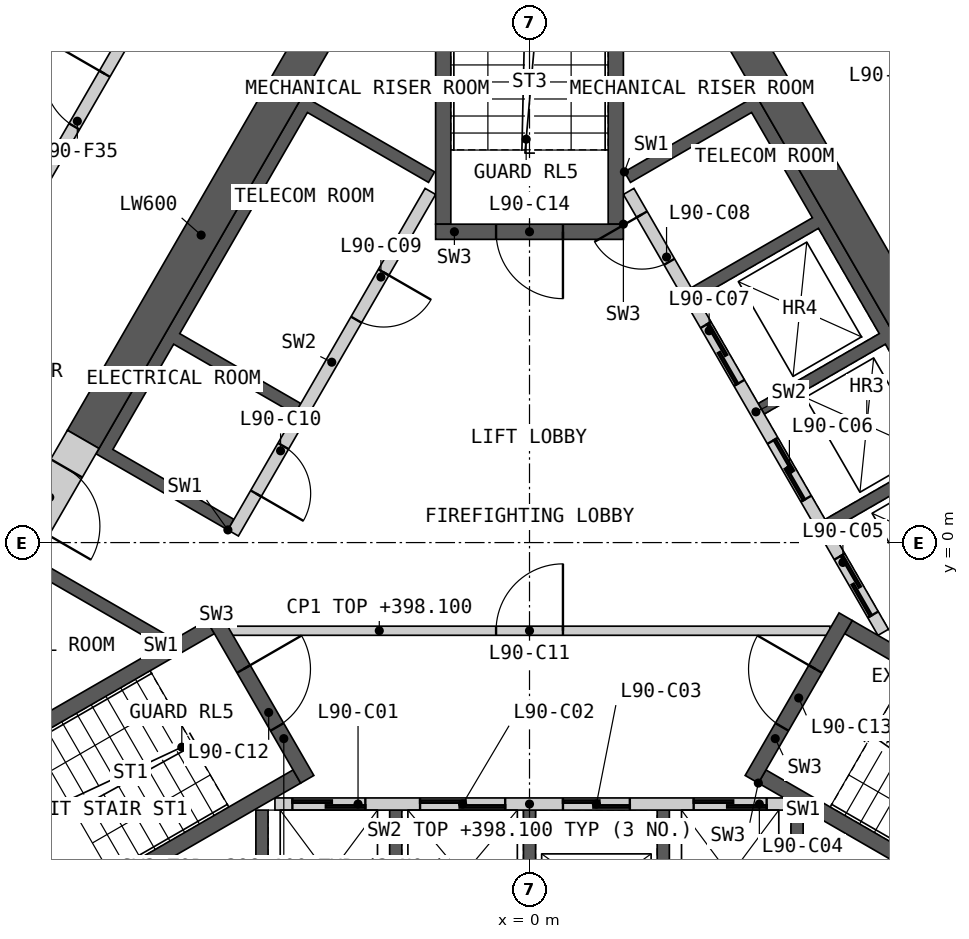
"""IFC4 building model, lengths in metres.
Left out: names, types, materials, properties, quantities, classifications, styles, units other than length and angle.
Written with IfcOpenShell. Run it as: python <this file> out.ifc"""

import sys

from ifc_helpers import new_model, si_unit, direction, frame, frame_2d, origin, place, context, subcontext, project, spatial, polyline, rectangle, outline, extrude, element, fill, save


model = new_model("IFC4")
c1 = context("Model", 3, precision=1e-05, world=origin(), true_north=direction((0.0, 1.0)))
c2 = subcontext(c1, "Body", "Model", "MODEL_VIEW")
j1 = project(units=[si_unit("LENGTHUNIT", "METRE"), si_unit("PLANEANGLEUNIT", "RADIAN")], contexts=[c1])
p1 = place(None, origin())
s1 = spatial("IfcSite", under=j1, at=p1, CompositionType="ELEMENT")
p2 = place(p1, origin())
s2 = spatial("IfcBuilding", under=s1, at=p2, CompositionType="ELEMENT")
p3 = place(p2, frame((0.0, 0.0, 395.0)))
s3 = spatial("IfcBuildingStorey", under=s2, at=p3, CompositionType="ELEMENT", Elevation=395.0)
p4 = place(p3, origin())
e1 = element("IfcWall", 1, at=p4, inside=s3, PredefinedType="SHEAR", context=c2, shape_type="SweptSolid", body=[
    extrude(outline(polyline([(4.5, -4.4), (4.5, -6.906), (-4.5, -6.906), (-4.5, -4.4), (-4.3, -4.4), (-4.3, -6.7), (-2.3, -6.7), (-2.3, -4.4), (-2.1, -4.4), (-2.1, -6.7), (-0.1, -6.7), (-0.1, -4.4), (0.1, -4.4), (0.1, -6.7), (2.1, -6.7), (2.1, -4.4), (2.3, -4.4), (2.3, -6.7), (4.3, -6.7), (4.3, -4.4), (4.5, -4.4)])), origin(), (0.0, 0.0, 1.0), 3.1),
])
p5 = place(p3, frame((-4.187, -4.3, 0.0), z_axis=(0.0, 0.0, 1.0), x_axis=(1.0, 0.0, 0.0)))
e2 = element("IfcWall", 2, at=p5, inside=s3, PredefinedType="SOLIDWALL", context=c2, shape_type="SweptSolid", body=[
    extrude(rectangle(XDim=8.373, YDim=0.2, at=frame_2d((4.187, 0.0))), origin(), (0.0, 0.0, 1.0), 3.1),
])
p6 = place(p5, frame((0.287, 0.0, 0.0)))
e3 = element("IfcOpeningElement", 3, at=p6, cuts=e2, PredefinedType="OPENING", context=c2, shape_type="SweptSolid", body=[
    extrude(rectangle(XDim=1.2, YDim=2.1, at=frame_2d((0.6, 1.05))), frame((0.0, 0.11, 0.0), z_axis=(0.0, -1.0, 0.0), x_axis=(1.0, 0.0, 0.0)), (0.0, 0.0, 1.0), 0.22),
])
p7 = place(p5, frame((2.387, 0.0, 0.0)))
e4 = element("IfcOpeningElement", 4, at=p7, cuts=e2, PredefinedType="OPENING", context=c2, shape_type="SweptSolid", body=[
    extrude(rectangle(XDim=1.4, YDim=2.1, at=frame_2d((0.7, 1.05))), frame((0.0, 0.11, 0.0), z_axis=(0.0, -1.0, 0.0), x_axis=(1.0, 0.0, 0.0)), (0.0, 0.0, 1.0), 0.22),
])
p8 = place(p5, frame((4.737, 0.0, 0.0)))
e5 = element("IfcOpeningElement", 5, at=p8, cuts=e2, PredefinedType="OPENING", context=c2, shape_type="SweptSolid", body=[
    extrude(rectangle(XDim=1.1, YDim=2.1, at=frame_2d((0.55, 1.05))), frame((0.0, 0.11, 0.0), z_axis=(0.0, -1.0, 0.0), x_axis=(1.0, 0.0, 0.0)), (0.0, 0.0, 1.0), 0.22),
])
p9 = place(p5, frame((6.887, 0.0, 0.0)))
e6 = element("IfcOpeningElement", 6, at=p9, cuts=e2, PredefinedType="OPENING", context=c2, shape_type="SweptSolid", body=[
    extrude(rectangle(XDim=1.2, YDim=2.1, at=frame_2d((0.6, 1.05))), frame((0.0, 0.11, 0.0), z_axis=(0.0, -1.0, 0.0), x_axis=(1.0, 0.0, 0.0)), (0.0, 0.0, 1.0), 0.22),
])
p10 = place(p3, origin())
e7 = element("IfcWall", 7, at=p10, inside=s3, PredefinedType="SHEAR", context=c2, shape_type="SweptSolid", body=[
    extrude(outline(polyline([(1.561, 6.097), (3.731, 7.35), (8.231, -0.444), (6.061, -1.697), (5.96, -1.524), (7.952, -0.374), (6.952, 1.358), (4.96, 0.208), (4.861, 0.381), (6.852, 1.531), (5.852, 3.263), (3.861, 2.113), (3.76, 2.287), (5.752, 3.437), (4.752, 5.169), (2.76, 4.019), (2.66, 4.192), (4.652, 5.342), (3.652, 7.074), (1.66, 5.924), (1.561, 6.097)])), origin(), (0.0, 0.0, 1.0), 3.1),
])
p11 = place(p3, frame((5.817, -1.476, 0.0), z_axis=(0.0, 0.0, 1.0), x_axis=(-0.500002616675, 0.866023893041, 0.0)))
e8 = element("IfcWall", 8, at=p11, inside=s3, PredefinedType="SOLIDWALL", context=c2, shape_type="SweptSolid", body=[
    extrude(rectangle(XDim=8.373, YDim=0.2, at=frame_2d((4.187, 0.0))), origin(), (0.0, 0.0, 1.0), 3.1),
])
p12 = place(p11, frame((0.337, 0.0, 0.0)))
e9 = element("IfcOpeningElement", 9, at=p12, cuts=e8, PredefinedType="OPENING", context=c2, shape_type="SweptSolid", body=[
    extrude(rectangle(XDim=1.1, YDim=2.1, at=frame_2d((0.55, 1.05))), frame((0.0, 0.11, 0.0), z_axis=(0.0, -1.0, 0.0), x_axis=(1.0, 0.0, 0.0)), (0.0, 0.0, 1.0), 0.22),
])
p13 = place(p11, frame((2.537, 0.0, 0.0)))
e10 = element("IfcOpeningElement", 10, at=p13, cuts=e8, PredefinedType="OPENING", context=c2, shape_type="SweptSolid", body=[
    extrude(rectangle(XDim=1.1, YDim=2.1, at=frame_2d((0.55, 1.05))), frame((0.0, 0.11, 0.0), z_axis=(0.0, -1.0, 0.0), x_axis=(1.0, 0.0, 0.0)), (0.0, 0.0, 1.0), 0.22),
])
p14 = place(p11, frame((4.737, 0.0, 0.0)))
e11 = element("IfcOpeningElement", 11, at=p14, cuts=e8, PredefinedType="OPENING", context=c2, shape_type="SweptSolid", body=[
    extrude(rectangle(XDim=1.1, YDim=2.1, at=frame_2d((0.55, 1.05))), frame((0.0, 0.11, 0.0), z_axis=(0.0, -1.0, 0.0), x_axis=(1.0, 0.0, 0.0)), (0.0, 0.0, 1.0), 0.22),
])
p15 = place(p11, frame((7.037, 0.0, 0.0)))
e12 = element("IfcOpeningElement", 12, at=p15, cuts=e8, PredefinedType="OPENING", context=c2, shape_type="SweptSolid", body=[
    extrude(rectangle(XDim=0.9, YDim=2.1, at=frame_2d((0.45, 1.05))), frame((0.0, 0.11, 0.0), z_axis=(0.0, -1.0, 0.0), x_axis=(1.0, 0.0, 0.0)), (0.0, 0.0, 1.0), 0.22),
])
p16 = place(p3, origin())
e13 = element("IfcWall", 13, at=p16, inside=s3, PredefinedType="SHEAR", context=c2, shape_type="SweptSolid", body=[
    extrude(outline(polyline([(-6.061, -1.697), (-8.231, -0.444), (-8.131, -0.271), (-5.96, -1.524), (-6.061, -1.697)])), origin(), (0.0, 0.0, 1.0), 3.1),
])
p17 = place(p3, origin())
e14 = element("IfcWall", 14, at=p17, inside=s3, PredefinedType="SHEAR", context=c2, shape_type="SweptSolid", body=[
    extrude(outline(polyline([(-4.96, 0.208), (-7.131, 1.461), (-3.731, 7.35), (-1.561, 6.097), (-1.66, 5.924), (-3.652, 7.074), (-5.752, 3.437), (-3.76, 2.287), (-3.861, 2.113), (-5.852, 3.263), (-6.852, 1.531), (-4.861, 0.381), (-4.96, 0.208)])), origin(), (0.0, 0.0, 1.0), 3.1),
])
p18 = place(p3, frame((-1.631, 5.776, 0.0), z_axis=(0.0, 0.0, 1.0), x_axis=(-0.499992876559, -0.866029516466, 0.0)))
e15 = element("IfcWall", 15, at=p18, inside=s3, PredefinedType="SOLIDWALL", context=c2, shape_type="SweptSolid", body=[
    extrude(rectangle(XDim=6.486, YDim=0.2, at=frame_2d((3.243, 0.0))), origin(), (0.0, 0.0, 1.0), 3.1),
])
p19 = place(p18, frame((1.537, 0.0, 0.0)))
e16 = element("IfcOpeningElement", 16, at=p19, cuts=e15, PredefinedType="OPENING", context=c2, shape_type="SweptSolid", body=[
    extrude(rectangle(XDim=0.9, YDim=2.1, at=frame_2d((0.45, 1.05))), frame((0.0, 0.11, 0.0), z_axis=(0.0, -1.0, 0.0), x_axis=(1.0, 0.0, 0.0)), (0.0, 0.0, 1.0), 0.22),
])
p20 = place(p18, frame((4.837, 0.0, 0.0)))
e17 = element("IfcOpeningElement", 17, at=p20, cuts=e15, PredefinedType="OPENING", context=c2, shape_type="SweptSolid", body=[
    extrude(rectangle(XDim=0.9, YDim=2.1, at=frame_2d((0.45, 1.05))), frame((0.0, 0.11, 0.0), z_axis=(0.0, -1.0, 0.0), x_axis=(1.0, 0.0, 0.0)), (0.0, 0.0, 1.0), 0.22),
])
p21 = place(p3, frame((-4.941, -1.45, 0.0), z_axis=(0.0, 0.0, 1.0), x_axis=(1.0, 0.0, 0.0)))
e18 = element("IfcWall", 18, at=p21, inside=s3, PredefinedType="PARTITIONING", context=c2, shape_type="SweptSolid", body=[
    extrude(rectangle(XDim=9.882, YDim=0.15, at=frame_2d((4.941, 0.0))), origin(), (0.0, 0.0, 1.0), 3.1),
])
p22 = place(p21, frame((4.391, 0.0, 0.0)))
e19 = element("IfcOpeningElement", 19, at=p22, cuts=e18, PredefinedType="OPENING", context=c2, shape_type="SweptSolid", body=[
    extrude(rectangle(XDim=1.1, YDim=2.1, at=frame_2d((0.55, 1.05))), frame((0.0, 0.085, 0.0), z_axis=(0.0, -1.0, 0.0), x_axis=(1.0, 0.0, 0.0)), (0.0, 0.0, 1.0), 0.17),
])
p23 = place(p3, origin())
e20 = element("IfcWall", 20, at=p23, inside=s3, PredefinedType="SHEAR", context=c2, shape_type="SweptSolid", body=[
    extrude(outline(polyline([(-5.307, -1.281), (-10.374, -4.206), (-10.032, -4.298), (-5.182, -1.498), (-5.307, -1.281)])), origin(), (0.0, 0.0, 1.0), 3.1),
])
p24 = place(p3, origin())
e21 = element("IfcWall", 21, at=p24, inside=s3, PredefinedType="SHEAR", context=c2, shape_type="SweptSolid", body=[
    extrude(outline(polyline([(-8.738, -6.539), (-8.83, -6.881), (-3.763, -3.956), (-3.888, -3.739), (-8.738, -6.539)])), origin(), (0.0, 0.0, 1.0), 3.1),
])
p25 = place(p3, frame((-5.199, -1.219, 0.0), z_axis=(0.0, 0.0, 1.0), x_axis=(0.499982516597, -0.866035497597, 0.0)))
e22 = element("IfcWall", 22, at=p25, inside=s3, PredefinedType="SHEAR", context=c2, shape_type="SweptSolid", body=[
    extrude(rectangle(XDim=3.088, YDim=0.25, at=frame_2d((1.544, 0.0))), origin(), (0.0, 0.0, 1.0), 3.1),
])
p26 = place(p25, frame((0.994, 0.0, 0.0)))
e23 = element("IfcOpeningElement", 23, at=p26, cuts=e22, PredefinedType="OPENING", context=c2, shape_type="SweptSolid", body=[
    extrude(rectangle(XDim=1.1, YDim=2.1, at=frame_2d((0.55, 1.05))), frame((0.0, 0.135, 0.0), z_axis=(0.0, -1.0, 0.0), x_axis=(1.0, 0.0, 0.0)), (0.0, 0.0, 1.0), 0.27),
])
p27 = place(p3, origin())
e24 = element("IfcWall", 24, at=p27, inside=s3, PredefinedType="SHEAR", context=c2, shape_type="SweptSolid", body=[
    extrude(outline(polyline([(3.763, -3.956), (8.83, -6.881), (8.738, -6.539), (3.888, -3.739), (3.763, -3.956)])), origin(), (0.0, 0.0, 1.0), 3.1),
])
p28 = place(p3, origin())
e25 = element("IfcWall", 25, at=p28, inside=s3, PredefinedType="SHEAR", context=c2, shape_type="SweptSolid", body=[
    extrude(outline(polyline([(10.032, -4.298), (10.374, -4.206), (5.307, -1.281), (5.182, -1.498), (10.032, -4.298)])), origin(), (0.0, 0.0, 1.0), 3.1),
])
p29 = place(p3, frame((3.655, -3.893, 0.0), z_axis=(0.0, 0.0, 1.0), x_axis=(0.499982516597, 0.866035497597, 0.0)))
e26 = element("IfcWall", 26, at=p29, inside=s3, PredefinedType="SHEAR", context=c2, shape_type="SweptSolid", body=[
    extrude(rectangle(XDim=3.088, YDim=0.25, at=frame_2d((1.544, 0.0))), origin(), (0.0, 0.0, 1.0), 3.1),
])
p30 = place(p29, frame((0.994, 0.0, 0.0)))
e27 = element("IfcOpeningElement", 27, at=p30, cuts=e26, PredefinedType="OPENING", context=c2, shape_type="SweptSolid", body=[
    extrude(rectangle(XDim=1.1, YDim=2.1, at=frame_2d((0.55, 1.05))), frame((0.0, 0.135, 0.0), z_axis=(0.0, -1.0, 0.0), x_axis=(1.0, 0.0, 0.0)), (0.0, 0.0, 1.0), 0.27),
])
p31 = place(p3, origin())
e28 = element("IfcWall", 28, at=p31, inside=s3, PredefinedType="SHEAR", context=c2, shape_type="SweptSolid", body=[
    extrude(outline(polyline([(1.544, 5.237), (1.544, 11.087), (1.294, 10.837), (1.294, 5.237), (1.544, 5.237)])), origin(), (0.0, 0.0, 1.0), 3.1),
])
p32 = place(p3, origin())
e29 = element("IfcWall", 29, at=p32, inside=s3, PredefinedType="SHEAR", context=c2, shape_type="SweptSolid", body=[
    extrude(outline(polyline([(-1.294, 10.837), (-1.544, 11.087), (-1.544, 5.237), (-1.294, 5.237), (-1.294, 10.837)])), origin(), (0.0, 0.0, 1.0), 3.1),
])
p33 = place(p3, frame((1.544, 5.112, 0.0), z_axis=(0.0, 0.0, 1.0), x_axis=(-1.0, 0.0, 0.0)))
e30 = element("IfcWall", 30, at=p33, inside=s3, PredefinedType="SHEAR", context=c2, shape_type="SweptSolid", body=[
    extrude(rectangle(XDim=3.088, YDim=0.25, at=frame_2d((1.544, 0.0))), origin(), (0.0, 0.0, 1.0), 3.1),
])
p34 = place(p33, frame((0.994, 0.0, 0.0)))
e31 = element("IfcOpeningElement", 31, at=p34, cuts=e30, PredefinedType="OPENING", context=c2, shape_type="SweptSolid", body=[
    extrude(rectangle(XDim=1.1, YDim=2.1, at=frame_2d((0.55, 1.05))), frame((0.0, 0.135, 0.0), z_axis=(0.0, -1.0, 0.0), x_axis=(1.0, 0.0, 0.0)), (0.0, 0.0, 1.0), 0.27),
])
p35 = place(p3, frame((8.686, -0.634, 0.0), z_axis=(0.0, 0.0, 1.0), x_axis=(-0.50001836461, 0.866014800712, 0.0)))
e32 = element("IfcWall", 32, at=p35, inside=s3, PredefinedType="SHEAR", context=c2, shape_type="SweptSolid", body=[
    extrude(rectangle(XDim=10.451, YDim=0.6, at=frame_2d((5.225, 0.0))), origin(), (0.0, 0.0, 1.0), 3.1),
])
p36 = place(p3, frame((-3.461, 8.417, 0.0), z_axis=(0.0, 0.0, 1.0), x_axis=(-0.50000391502, -0.866023143435, 0.0)))
e33 = element("IfcWall", 33, at=p36, inside=s3, PredefinedType="SHEAR", context=c2, shape_type="SweptSolid", body=[
    extrude(rectangle(XDim=7.759, YDim=0.6, at=frame_2d((3.879, 0.0))), origin(), (0.0, 0.0, 1.0), 3.1),
])
p37 = place(p3, frame((-7.34, 1.698, 0.0), z_axis=(0.0, 0.0, 1.0), x_axis=(-0.50002983664, -0.866008176907, 0.0)))
e34 = element("IfcWall", 34, at=p37, inside=s3, PredefinedType="SHEAR", context=c2, shape_type="SweptSolid", body=[
    extrude(rectangle(XDim=2.2, YDim=0.6, at=frame_2d((1.1, 0.0))), origin(), (0.0, 0.0, 1.0), 3.1),
])
p38 = place(p37, frame((0.55, 0.0, 0.0)))
e35 = element("IfcOpeningElement", 35, at=p38, cuts=e34, PredefinedType="OPENING", context=c2, shape_type="SweptSolid", body=[
    extrude(rectangle(XDim=1.1, YDim=2.1, at=frame_2d((0.55, 1.05))), frame((0.0, 0.31, 0.0), z_axis=(0.0, -1.0, 0.0), x_axis=(1.0, 0.0, 0.0)), (0.0, 0.0, 1.0), 0.62),
])
p39 = place(p3, frame((4.403, 12.185, 0.0), z_axis=(0.0, 0.0, 1.0), x_axis=(0.499992155518, -0.866029932751, 0.0)))
e36 = element("IfcWall", 36, at=p39, inside=s3, PredefinedType="PARTITIONING", context=c2, shape_type="SweptSolid", body=[
    extrude(rectangle(XDim=8.123, YDim=0.2, at=frame_2d((4.062, 0.0))), origin(), (0.0, 0.0, 1.0), 3.1),
])
p40 = place(p39, frame((3.762, 0.0, 0.0)))
e37 = element("IfcOpeningElement", 37, at=p40, cuts=e36, PredefinedType="OPENING", context=c2, shape_type="SweptSolid", body=[
    extrude(rectangle(XDim=1.0, YDim=2.1, at=frame_2d((0.5, 1.05))), frame((0.0, 0.11, 0.0), z_axis=(0.0, -1.0, 0.0), x_axis=(1.0, 0.0, 0.0)), (0.0, 0.0, 1.0), 0.22),
])
p41 = place(p3, frame((-8.465, 5.15, 0.0), z_axis=(0.0, 0.0, 1.0), x_axis=(0.499992155518, 0.866029932751, 0.0)))
e38 = element("IfcWall", 38, at=p41, inside=s3, PredefinedType="PARTITIONING", context=c2, shape_type="SweptSolid", body=[
    extrude(rectangle(XDim=8.123, YDim=0.2, at=frame_2d((4.062, 0.0))), origin(), (0.0, 0.0, 1.0), 3.1),
])
p42 = place(p41, frame((1.956, 0.0, 0.0)))
e39 = element("IfcOpeningElement", 39, at=p42, cuts=e38, PredefinedType="OPENING", context=c2, shape_type="SweptSolid", body=[
    extrude(rectangle(XDim=1.0, YDim=2.1, at=frame_2d((0.5, 1.05))), frame((0.0, 0.11, 0.0), z_axis=(0.0, -1.0, 0.0), x_axis=(1.0, 0.0, 0.0)), (0.0, 0.0, 1.0), 0.22),
])
p43 = place(p6, origin())
e40 = element("IfcDoor", 40, at=p43, inside=s3, OperationType="SLIDING_TO_LEFT", PredefinedType="DOOR", context=c2, shape_type="SweptSolid", body=[
    extrude(rectangle(XDim=1.2, YDim=2.1, at=frame_2d((0.6, 1.05))), frame((0.0, 0.025, 0.0), z_axis=(0.0, -1.0, 0.0), x_axis=(1.0, 0.0, 0.0)), (0.0, 0.0, 1.0), 0.05),
])
fill(e3, e40)
p44 = place(p7, origin())
e41 = element("IfcDoor", 41, at=p44, inside=s3, OperationType="SLIDING_TO_LEFT", PredefinedType="DOOR", context=c2, shape_type="SweptSolid", body=[
    extrude(rectangle(XDim=1.4, YDim=2.1, at=frame_2d((0.7, 1.05))), frame((0.0, 0.025, 0.0), z_axis=(0.0, -1.0, 0.0), x_axis=(1.0, 0.0, 0.0)), (0.0, 0.0, 1.0), 0.05),
])
fill(e4, e41)
p45 = place(p8, origin())
e42 = element("IfcDoor", 42, at=p45, inside=s3, OperationType="SLIDING_TO_LEFT", PredefinedType="DOOR", context=c2, shape_type="SweptSolid", body=[
    extrude(rectangle(XDim=1.1, YDim=2.1, at=frame_2d((0.55, 1.05))), frame((0.0, 0.025, 0.0), z_axis=(0.0, -1.0, 0.0), x_axis=(1.0, 0.0, 0.0)), (0.0, 0.0, 1.0), 0.05),
])
fill(e5, e42)
p46 = place(p9, origin())
e43 = element("IfcDoor", 43, at=p46, inside=s3, OperationType="SLIDING_TO_LEFT", PredefinedType="DOOR", context=c2, shape_type="SweptSolid", body=[
    extrude(rectangle(XDim=1.2, YDim=2.1, at=frame_2d((0.6, 1.05))), frame((0.0, 0.025, 0.0), z_axis=(0.0, -1.0, 0.0), x_axis=(1.0, 0.0, 0.0)), (0.0, 0.0, 1.0), 0.05),
])
fill(e6, e43)
p47 = place(p12, origin())
e44 = element("IfcDoor", 44, at=p47, inside=s3, OperationType="SLIDING_TO_LEFT", PredefinedType="DOOR", context=c2, shape_type="SweptSolid", body=[
    extrude(rectangle(XDim=1.1, YDim=2.1, at=frame_2d((0.55, 1.05))), frame((0.0, 0.025, 0.0), z_axis=(0.0, -1.0, 0.0), x_axis=(1.0, 0.0, 0.0)), (0.0, 0.0, 1.0), 0.05),
])
fill(e9, e44)
p48 = place(p13, origin())
e45 = element("IfcDoor", 45, at=p48, inside=s3, OperationType="SLIDING_TO_LEFT", PredefinedType="DOOR", context=c2, shape_type="SweptSolid", body=[
    extrude(rectangle(XDim=1.1, YDim=2.1, at=frame_2d((0.55, 1.05))), frame((0.0, 0.025, 0.0), z_axis=(0.0, -1.0, 0.0), x_axis=(1.0, 0.0, 0.0)), (0.0, 0.0, 1.0), 0.05),
])
fill(e10, e45)
p49 = place(p14, origin())
e46 = element("IfcDoor", 46, at=p49, inside=s3, OperationType="SLIDING_TO_LEFT", PredefinedType="DOOR", context=c2, shape_type="SweptSolid", body=[
    extrude(rectangle(XDim=1.1, YDim=2.1, at=frame_2d((0.55, 1.05))), frame((0.0, 0.025, 0.0), z_axis=(0.0, -1.0, 0.0), x_axis=(1.0, 0.0, 0.0)), (0.0, 0.0, 1.0), 0.05),
])
fill(e11, e46)
p50 = place(p15, origin())
e47 = element("IfcDoor", 47, at=p50, inside=s3, OperationType="SINGLE_SWING_RIGHT", PredefinedType="DOOR", context=c2, shape_type="SweptSolid", body=[
    extrude(rectangle(XDim=0.9, YDim=2.1, at=frame_2d((0.45, 1.05))), frame((0.0, 0.025, 0.0), z_axis=(0.0, -1.0, 0.0), x_axis=(1.0, 0.0, 0.0)), (0.0, 0.0, 1.0), 0.05),
])
fill(e12, e47)
p51 = place(p19, origin())
e48 = element("IfcDoor", 48, at=p51, inside=s3, OperationType="SINGLE_SWING_LEFT", PredefinedType="DOOR", context=c2, shape_type="SweptSolid", body=[
    extrude(rectangle(XDim=0.9, YDim=2.1, at=frame_2d((0.45, 1.05))), frame((0.0, 0.025, 0.0), z_axis=(0.0, -1.0, 0.0), x_axis=(1.0, 0.0, 0.0)), (0.0, 0.0, 1.0), 0.05),
])
fill(e16, e48)
p52 = place(p20, origin())
e49 = element("IfcDoor", 49, at=p52, inside=s3, OperationType="SINGLE_SWING_RIGHT", PredefinedType="DOOR", context=c2, shape_type="SweptSolid", body=[
    extrude(rectangle(XDim=0.9, YDim=2.1, at=frame_2d((0.45, 1.05))), frame((0.0, 0.025, 0.0), z_axis=(0.0, -1.0, 0.0), x_axis=(1.0, 0.0, 0.0)), (0.0, 0.0, 1.0), 0.05),
])
fill(e17, e49)
p53 = place(p22, origin())
e50 = element("IfcDoor", 50, at=p53, inside=s3, OperationType="SINGLE_SWING_RIGHT", PredefinedType="DOOR", context=c2, shape_type="SweptSolid", body=[
    extrude(rectangle(XDim=1.1, YDim=2.1, at=frame_2d((0.55, 1.05))), frame((0.0, 0.025, 0.0), z_axis=(0.0, -1.0, 0.0), x_axis=(1.0, 0.0, 0.0)), (0.0, 0.0, 1.0), 0.05),
])
fill(e19, e50)
p54 = place(p26, origin())
e51 = element("IfcDoor", 51, at=p54, inside=s3, OperationType="SINGLE_SWING_LEFT", PredefinedType="DOOR", context=c2, shape_type="SweptSolid", body=[
    extrude(rectangle(XDim=1.1, YDim=2.1, at=frame_2d((0.55, 1.05))), frame((0.0, 0.025, 0.0), z_axis=(0.0, -1.0, 0.0), x_axis=(1.0, 0.0, 0.0)), (0.0, 0.0, 1.0), 0.05),
])
fill(e23, e51)
p55 = place(p30, origin())
e52 = element("IfcDoor", 52, at=p55, inside=s3, OperationType="SINGLE_SWING_RIGHT", PredefinedType="DOOR", context=c2, shape_type="SweptSolid", body=[
    extrude(rectangle(XDim=1.1, YDim=2.1, at=frame_2d((0.55, 1.05))), frame((0.0, 0.025, 0.0), z_axis=(0.0, -1.0, 0.0), x_axis=(1.0, 0.0, 0.0)), (0.0, 0.0, 1.0), 0.05),
])
fill(e27, e52)
p56 = place(p34, origin())
e53 = element("IfcDoor", 53, at=p56, inside=s3, OperationType="SINGLE_SWING_LEFT", PredefinedType="DOOR", context=c2, shape_type="SweptSolid", body=[
    extrude(rectangle(XDim=1.1, YDim=2.1, at=frame_2d((0.55, 1.05))), frame((0.0, 0.025, 0.0), z_axis=(0.0, -1.0, 0.0), x_axis=(1.0, 0.0, 0.0)), (0.0, 0.0, 1.0), 0.05),
])
fill(e31, e53)
p57 = place(p38, origin())
e54 = element("IfcDoor", 54, at=p57, inside=s3, OperationType="SINGLE_SWING_RIGHT", PredefinedType="DOOR", context=c2, shape_type="SweptSolid", body=[
    extrude(rectangle(XDim=1.1, YDim=2.1, at=frame_2d((0.55, 1.05))), frame((0.0, 0.055, 0.0), z_axis=(0.0, -1.0, 0.0), x_axis=(1.0, 0.0, 0.0)), (0.0, 0.0, 1.0), 0.05),
])
fill(e35, e54)
p58 = place(p42, origin())
e55 = element("IfcDoor", 55, at=p58, inside=s3, OperationType="SINGLE_SWING_RIGHT", PredefinedType="DOOR", context=c2, shape_type="SweptSolid", body=[
    extrude(rectangle(XDim=1.0, YDim=2.1, at=frame_2d((0.5, 1.05))), frame((0.0, 0.025, 0.0), z_axis=(0.0, -1.0, 0.0), x_axis=(1.0, 0.0, 0.0)), (0.0, 0.0, 1.0), 0.05),
])
fill(e39, e55)
save(model, sys.argv[1])
